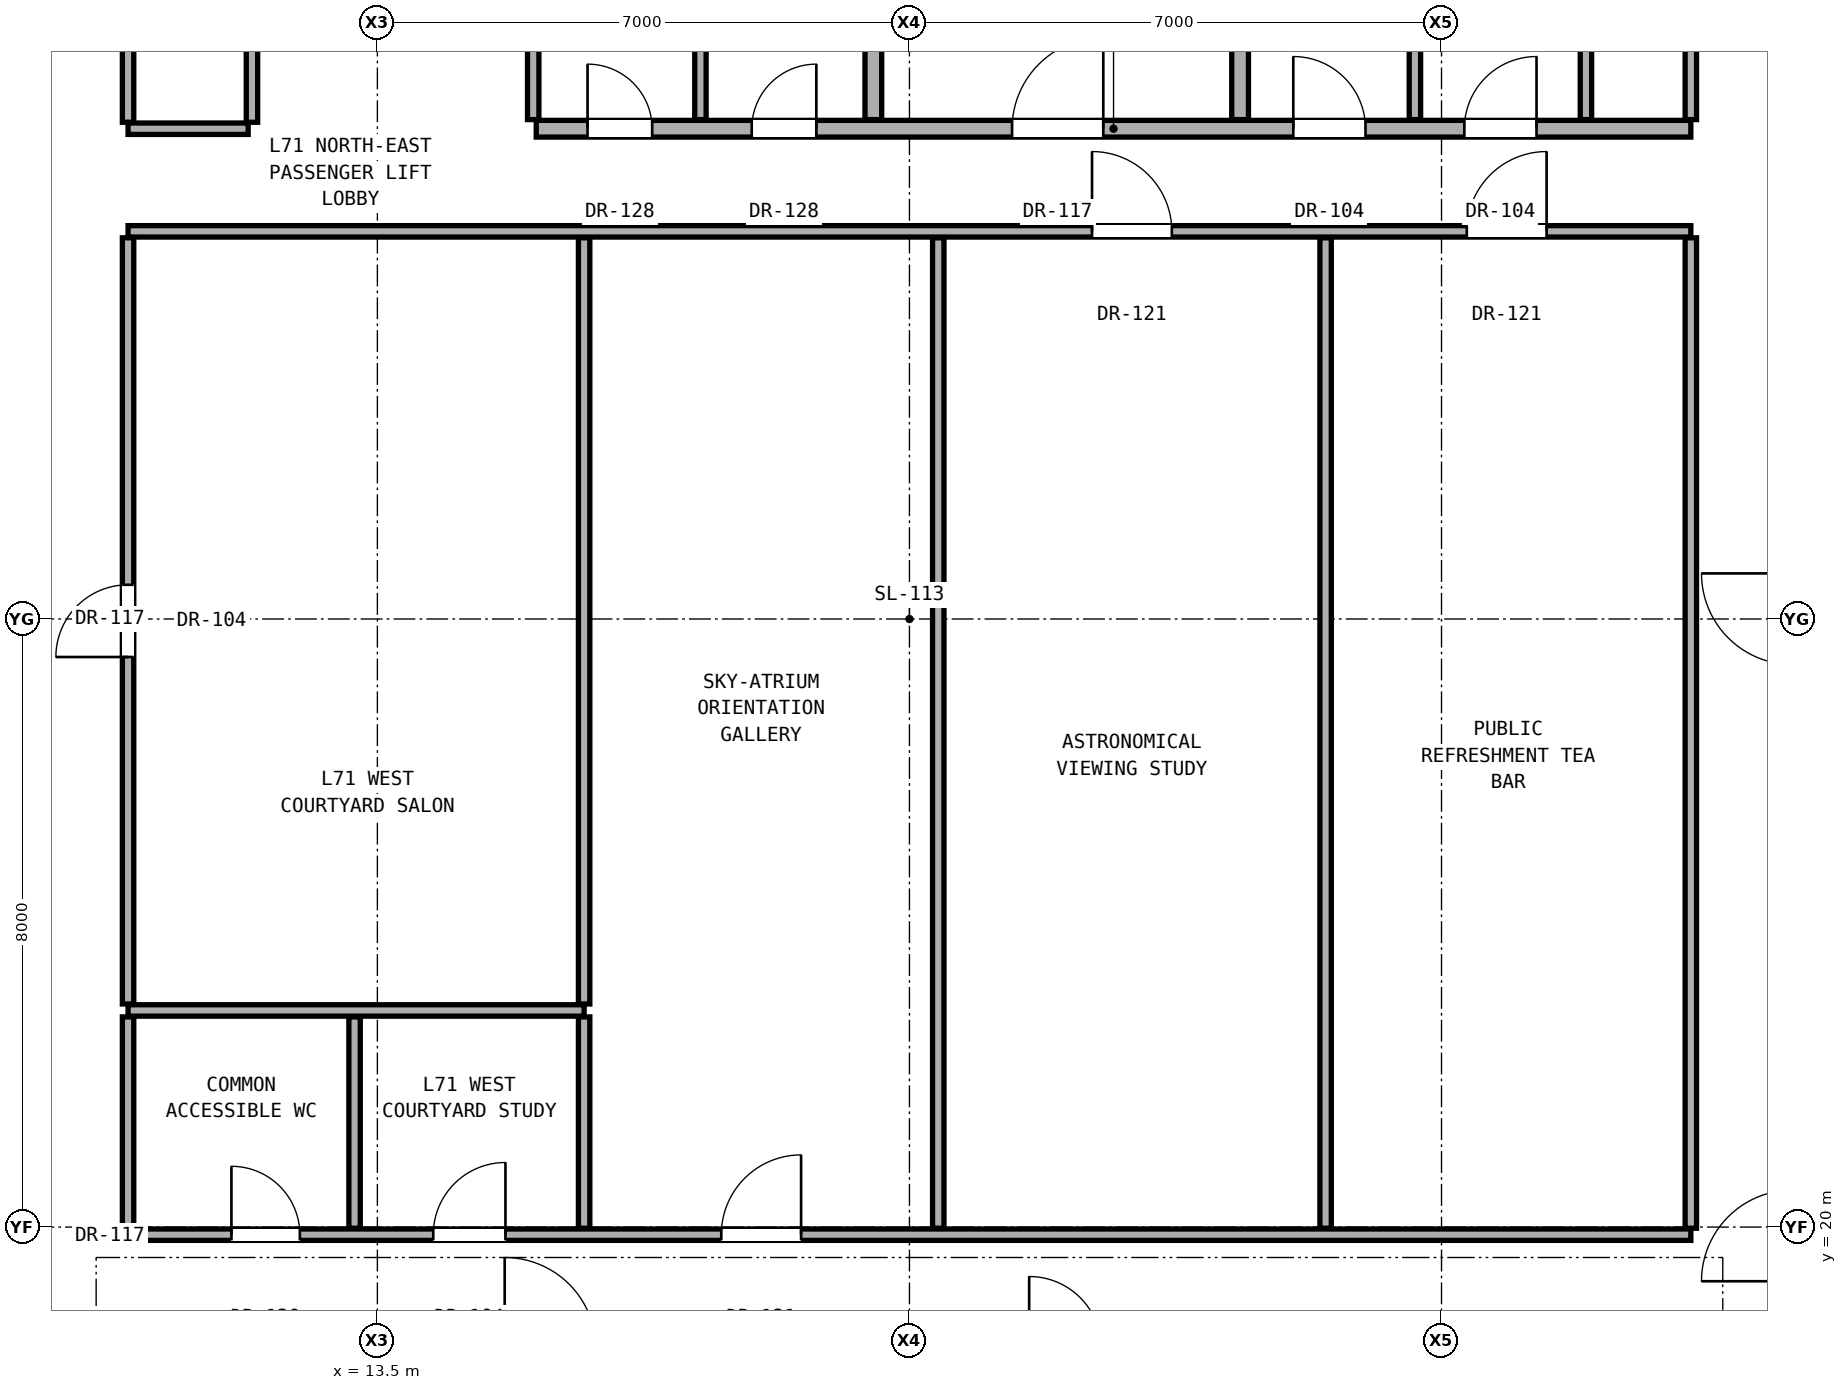
"""IFC4 building model, lengths in metres.
Left out: names, types, materials, properties, quantities, classifications, styles, units other than length and angle.
Written with IfcOpenShell. Run it as: python <this file> out.ifc"""

import sys

from ifc_helpers import new_model, si_unit, direction, frame, frame_2d, origin, place, context, subcontext, project, spatial, rectangle, extrude, element, fill, save


model = new_model("IFC4")
c1 = context("Model", 3, precision=1e-05, world=origin(), true_north=direction((0.0, 1.0)))
c2 = subcontext(c1, "Body", "Model", "MODEL_VIEW")
j1 = project(units=[si_unit("LENGTHUNIT", "METRE"), si_unit("PLANEANGLEUNIT", "RADIAN")], contexts=[c1])
p1 = place(None, origin())
s1 = spatial("IfcSite", under=j1, at=p1, CompositionType="ELEMENT")
p2 = place(p1, origin())
s2 = spatial("IfcBuilding", under=s1, at=p2, CompositionType="ELEMENT")
p3 = place(p2, frame((0.0, 0.0, 249.1)))
s3 = spatial("IfcBuildingStorey", under=s2, at=p3, CompositionType="ELEMENT", Elevation=249.1)
p4 = place(p3, frame((10.22, 19.9, 0.0), z_axis=(0.0, 0.0, 1.0), x_axis=(1.0, 0.0, 0.0)))
e1 = element("IfcWall", 1, at=p4, inside=s3, PredefinedType="PARTITIONING", context=c2, shape_type="SweptSolid", body=[
    extrude(rectangle(XDim=20.56, YDim=0.15, at=frame_2d((10.28, 0.0))), origin(), (0.0, 0.0, 1.0), 2.536),
])
p5 = place(p4, frame((1.36, 0.0, 0.0)))
e2 = element("IfcOpeningElement", 2, at=p5, cuts=e1, PredefinedType="OPENING", context=c2, shape_type="SweptSolid", body=[
    extrude(rectangle(XDim=0.9, YDim=2.1, at=frame_2d((0.45, 1.05))), frame((0.0, 0.085, 0.0), z_axis=(0.0, -1.0, 0.0), x_axis=(1.0, 0.0, 0.0)), (0.0, 0.0, 1.0), 0.17),
])
p6 = place(p4, frame((4.015, 0.0, 0.0)))
e3 = element("IfcOpeningElement", 3, at=p6, cuts=e1, PredefinedType="OPENING", context=c2, shape_type="SweptSolid", body=[
    extrude(rectangle(XDim=0.95, YDim=2.15, at=frame_2d((0.475, 1.075))), frame((0.0, 0.085, 0.0), z_axis=(0.0, -1.0, 0.0), x_axis=(1.0, 0.0, 0.0)), (0.0, 0.0, 1.0), 0.17),
])
p7 = place(p4, frame((7.804, 0.0, 0.0)))
e4 = element("IfcOpeningElement", 4, at=p7, cuts=e1, PredefinedType="OPENING", context=c2, shape_type="SweptSolid", body=[
    extrude(rectangle(XDim=1.05, YDim=2.2, at=frame_2d((0.525, 1.1))), frame((0.0, 0.085, 0.0), z_axis=(0.0, -1.0, 0.0), x_axis=(1.0, 0.0, 0.0)), (0.0, 0.0, 1.0), 0.17),
])
p8 = place(p3, frame((10.22, 22.85, 0.0), z_axis=(0.0, 0.0, 1.0), x_axis=(1.0, 0.0, 0.0)))
e5 = element("IfcWall", 5, at=p8, inside=s3, PredefinedType="PARTITIONING", context=c2, shape_type="SweptSolid", body=[
    extrude(rectangle(XDim=6.0, YDim=0.15, at=frame_2d((3.0, 0.0))), origin(), (0.0, 0.0, 1.0), 2.536),
])
p9 = place(p3, frame((10.22, 33.1, 0.0), z_axis=(0.0, 0.0, 1.0), x_axis=(1.0, 0.0, 0.0)))
e6 = element("IfcWall", 6, at=p9, inside=s3, PredefinedType="PARTITIONING", context=c2, shape_type="SweptSolid", body=[
    extrude(rectangle(XDim=20.56, YDim=0.15, at=frame_2d((10.28, 0.0))), origin(), (0.0, 0.0, 1.0), 2.536),
])
p10 = place(p9, frame((12.682, 0.0, 0.0)))
e7 = element("IfcOpeningElement", 7, at=p10, cuts=e6, PredefinedType="OPENING", context=c2, shape_type="SweptSolid", body=[
    extrude(rectangle(XDim=1.05, YDim=2.2, at=frame_2d((0.525, 1.1))), frame((0.0, 0.085, 0.0), z_axis=(0.0, -1.0, 0.0), x_axis=(1.0, 0.0, 0.0)), (0.0, 0.0, 1.0), 0.17),
])
p11 = place(p9, frame((17.613, 0.0, 0.0)))
e8 = element("IfcOpeningElement", 8, at=p11, cuts=e6, PredefinedType="OPENING", context=c2, shape_type="SweptSolid", body=[
    extrude(rectangle(XDim=1.05, YDim=2.2, at=frame_2d((0.525, 1.1))), frame((0.0, 0.085, 0.0), z_axis=(0.0, -1.0, 0.0), x_axis=(1.0, 0.0, 0.0)), (0.0, 0.0, 1.0), 0.17),
])
p12 = place(p3, frame((10.22, 34.45, 0.0), z_axis=(0.0, 0.0, 1.0), x_axis=(1.0, 0.0, 0.0)))
e9 = element("IfcWall", 9, at=p12, inside=s3, PredefinedType="PARTITIONING", context=c2, shape_type="SweptSolid", body=[
    extrude(rectangle(XDim=1.58, YDim=0.15, at=frame_2d((0.79, 0.0))), origin(), (0.0, 0.0, 1.0), 2.536),
])
p13 = place(p3, frame((15.59, 34.45, 0.0), z_axis=(0.0, 0.0, 1.0), x_axis=(1.0, 0.0, 0.0)))
e10 = element("IfcWall", 10, at=p13, inside=s3, PredefinedType="SOLIDWALL", context=c2, shape_type="SweptSolid", body=[
    extrude(rectangle(XDim=15.19, YDim=0.22, at=frame_2d((7.595, 0.0))), origin(), (0.0, 0.0, 1.0), 2.536),
])
p14 = place(p13, frame((6.26, 0.0, 0.0)))
e11 = element("IfcOpeningElement", 11, at=p14, cuts=e10, PredefinedType="OPENING", context=c2, shape_type="SweptSolid", body=[
    extrude(rectangle(XDim=1.2, YDim=2.25, at=frame_2d((0.6, 1.125))), frame((0.0, 0.12, 0.0), z_axis=(0.0, -1.0, 0.0), x_axis=(1.0, 0.0, 0.0)), (0.0, 0.0, 1.0), 0.24),
])
p15 = place(p13, frame((9.96, 0.0, 0.0)))
e12 = element("IfcOpeningElement", 12, at=p15, cuts=e10, PredefinedType="OPENING", context=c2, shape_type="SweptSolid", body=[
    extrude(rectangle(XDim=0.95, YDim=2.15, at=frame_2d((0.475, 1.075))), frame((0.0, 0.12, 0.0), z_axis=(0.0, -1.0, 0.0), x_axis=(1.0, 0.0, 0.0)), (0.0, 0.0, 1.0), 0.24),
])
p16 = place(p13, frame((12.21, 0.0, 0.0)))
e13 = element("IfcOpeningElement", 13, at=p16, cuts=e10, PredefinedType="OPENING", context=c2, shape_type="SweptSolid", body=[
    extrude(rectangle(XDim=0.95, YDim=2.15, at=frame_2d((0.475, 1.075))), frame((0.0, 0.12, 0.0), z_axis=(0.0, -1.0, 0.0), x_axis=(1.0, 0.0, 0.0)), (0.0, 0.0, 1.0), 0.24),
])
p17 = place(p13, frame((0.675, 0.0, 0.0)))
e14 = element("IfcOpeningElement", 14, at=p17, cuts=e10, PredefinedType="OPENING", context=c2, shape_type="SweptSolid", body=[
    extrude(rectangle(XDim=0.85, YDim=2.01, at=frame_2d((0.425, 1.005))), frame((0.0, 0.12, 0.0), z_axis=(0.0, -1.0, 0.0), x_axis=(1.0, 0.0, 0.0)), (0.0, 0.0, 1.0), 0.24),
])
p18 = place(p13, frame((2.835, 0.0, 0.0)))
e15 = element("IfcOpeningElement", 15, at=p18, cuts=e10, PredefinedType="OPENING", context=c2, shape_type="SweptSolid", body=[
    extrude(rectangle(XDim=0.85, YDim=2.01, at=frame_2d((0.425, 1.005))), frame((0.0, 0.12, 0.0), z_axis=(0.0, -1.0, 0.0), x_axis=(1.0, 0.0, 0.0)), (0.0, 0.0, 1.0), 0.24),
])
p19 = place(p3, frame((10.22, 19.985, 0.0), z_axis=(0.0, 0.0, 1.0), x_axis=(0.0, 1.0, 0.0)))
e16 = element("IfcWall", 16, at=p19, inside=s3, PredefinedType="PARTITIONING", context=c2, shape_type="SweptSolid", body=[
    extrude(rectangle(XDim=2.78, YDim=0.15, at=frame_2d((1.39, 0.0))), origin(), (0.0, 0.0, 1.0), 3.4),
])
p20 = place(p3, frame((10.22, 22.935, 0.0), z_axis=(0.0, 0.0, 1.0), x_axis=(0.0, 1.0, 0.0)))
e17 = element("IfcWall", 17, at=p20, inside=s3, PredefinedType="PARTITIONING", context=c2, shape_type="SweptSolid", body=[
    extrude(rectangle(XDim=10.08, YDim=0.15, at=frame_2d((5.04, 0.0))), origin(), (0.0, 0.0, 1.0), 2.696),
])
p21 = place(p20, frame((4.565, 0.0, 0.0)))
e18 = element("IfcOpeningElement", 18, at=p21, cuts=e17, PredefinedType="OPENING", context=c2, shape_type="SweptSolid", body=[
    extrude(rectangle(XDim=0.95, YDim=2.15, at=frame_2d((0.475, 1.075))), frame((0.0, 0.085, 0.0), z_axis=(0.0, -1.0, 0.0), x_axis=(1.0, 0.0, 0.0)), (0.0, 0.0, 1.0), 0.17),
])
p22 = place(p3, frame((10.22, 34.535, 0.0), z_axis=(0.0, 0.0, 1.0), x_axis=(0.0, 1.0, 0.0)))
e19 = element("IfcWall", 19, at=p22, inside=s3, PredefinedType="PARTITIONING", context=c2, shape_type="SweptSolid", body=[
    extrude(rectangle(XDim=9.13, YDim=0.15, at=frame_2d((4.565, 0.0))), origin(), (0.0, 0.0, 1.0), 2.792),
])
p23 = place(p3, frame((11.85, 34.535, 0.0), z_axis=(0.0, 0.0, 1.0), x_axis=(0.0, 1.0, 0.0)))
e20 = element("IfcWall", 20, at=p23, inside=s3, PredefinedType="PARTITIONING", context=c2, shape_type="SweptSolid", body=[
    extrude(rectangle(XDim=2.845, YDim=0.15, at=frame_2d((1.422, 0.0))), origin(), (0.0, 0.0, 1.0), 3.4),
])
p24 = place(p3, frame((13.2, 19.985, 0.0), z_axis=(0.0, 0.0, 1.0), x_axis=(0.0, 1.0, 0.0)))
e21 = element("IfcWall", 21, at=p24, inside=s3, PredefinedType="PARTITIONING", context=c2, shape_type="SweptSolid", body=[
    extrude(rectangle(XDim=2.78, YDim=0.15, at=frame_2d((1.39, 0.0))), origin(), (0.0, 0.0, 1.0), 3.4),
])
p25 = place(p3, frame((15.55, 34.57, 0.0), z_axis=(0.0, 0.0, 1.0), x_axis=(0.0, 1.0, 0.0)))
e22 = element("IfcWall", 22, at=p25, inside=s3, PredefinedType="PARTITIONING", context=c2, shape_type="SweptSolid", body=[
    extrude(rectangle(XDim=2.81, YDim=0.15, at=frame_2d((1.405, 0.0))), origin(), (0.0, 0.0, 1.0), 3.4),
])
p26 = place(p3, frame((16.22, 19.985, 0.0), z_axis=(0.0, 0.0, 1.0), x_axis=(0.0, 1.0, 0.0)))
e23 = element("IfcWall", 23, at=p26, inside=s3, PredefinedType="PARTITIONING", context=c2, shape_type="SweptSolid", body=[
    extrude(rectangle(XDim=2.78, YDim=0.15, at=frame_2d((1.39, 0.0))), origin(), (0.0, 0.0, 1.0), 3.4),
])
p27 = place(p3, frame((16.22, 22.935, 0.0), z_axis=(0.0, 0.0, 1.0), x_axis=(0.0, 1.0, 0.0)))
e24 = element("IfcWall", 24, at=p27, inside=s3, PredefinedType="PARTITIONING", context=c2, shape_type="SweptSolid", body=[
    extrude(rectangle(XDim=10.08, YDim=0.15, at=frame_2d((5.04, 0.0))), origin(), (0.0, 0.0, 1.0), 2.536),
])
p28 = place(p3, frame((17.75, 34.57, 0.0), z_axis=(0.0, 0.0, 1.0), x_axis=(0.0, 1.0, 0.0)))
e25 = element("IfcWall", 25, at=p28, inside=s3, PredefinedType="PARTITIONING", context=c2, shape_type="SweptSolid", body=[
    extrude(rectangle(XDim=2.81, YDim=0.15, at=frame_2d((1.405, 0.0))), origin(), (0.0, 0.0, 1.0), 3.4),
])
p29 = place(p3, frame((20.025, 34.57, 0.0), z_axis=(0.0, 0.0, 1.0), x_axis=(0.0, 1.0, 0.0)))
e26 = element("IfcWall", 26, at=p29, inside=s3, PredefinedType="SOLIDWALL", context=c2, shape_type="SweptSolid", body=[
    extrude(rectangle(XDim=2.81, YDim=0.22, at=frame_2d((1.405, 0.0))), origin(), (0.0, 0.0, 1.0), 3.4),
])
p30 = place(p3, frame((20.879, 19.985, 0.0), z_axis=(0.0, 0.0, 1.0), x_axis=(0.0, 1.0, 0.0)))
e27 = element("IfcWall", 27, at=p30, inside=s3, PredefinedType="PARTITIONING", context=c2, shape_type="SweptSolid", body=[
    extrude(rectangle(XDim=13.03, YDim=0.15, at=frame_2d((6.515, 0.0))), origin(), (0.0, 0.0, 1.0), 2.536),
])
p31 = place(p3, frame((24.85, 34.57, 0.0), z_axis=(0.0, 0.0, 1.0), x_axis=(0.0, 1.0, 0.0)))
e28 = element("IfcWall", 28, at=p31, inside=s3, PredefinedType="SOLIDWALL", context=c2, shape_type="SweptSolid", body=[
    extrude(rectangle(XDim=2.81, YDim=0.22, at=frame_2d((1.405, 0.0))), origin(), (0.0, 0.0, 1.0), 3.4),
])
p32 = place(p3, frame((25.975, 19.985, 0.0), z_axis=(0.0, 0.0, 1.0), x_axis=(0.0, 1.0, 0.0)))
e29 = element("IfcWall", 29, at=p32, inside=s3, PredefinedType="PARTITIONING", context=c2, shape_type="SweptSolid", body=[
    extrude(rectangle(XDim=13.03, YDim=0.15, at=frame_2d((6.515, 0.0))), origin(), (0.0, 0.0, 1.0), 2.536),
])
for number, where, z_axis, x_axis in (
    (30, (27.15, 34.57, 0.0), (0.0, 0.0, 1.0), (0.0, 1.0, 0.0)),
    (31, (29.4, 34.57, 0.0), (0.0, 0.0, 1.0), (0.0, 1.0, 0.0)),
):
    element("IfcWall", number, at=place(p3, frame(where, z_axis=z_axis, x_axis=x_axis)), inside=s3, PredefinedType="PARTITIONING", context=c2, shape_type="SweptSolid", body=[
        extrude(rectangle(XDim=2.81, YDim=0.15, at=frame_2d((1.405, 0.0))), origin(), (0.0, 0.0, 1.0), 3.4),
    ])
p33 = place(p3, frame((30.78, 19.985, 0.0), z_axis=(0.0, 0.0, 1.0), x_axis=(0.0, 1.0, 0.0)))
e32 = element("IfcWall", 32, at=p33, inside=s3, PredefinedType="PARTITIONING", context=c2, shape_type="SweptSolid", body=[
    extrude(rectangle(XDim=13.03, YDim=0.15, at=frame_2d((6.515, 0.0))), origin(), (0.0, 0.0, 1.0), 2.696),
])
p34 = place(p3, frame((30.78, 34.57, 0.0), z_axis=(0.0, 0.0, 1.0), x_axis=(0.0, 1.0, 0.0)))
e33 = element("IfcWall", 33, at=p34, inside=s3, PredefinedType="PARTITIONING", context=c2, shape_type="SweptSolid", body=[
    extrude(rectangle(XDim=9.095, YDim=0.15, at=frame_2d((4.547, 0.0))), origin(), (0.0, 0.0, 1.0), 2.792),
])
p35 = place(p14, origin())
e34 = element("IfcDoor", 34, at=p35, inside=s3, OperationType="SINGLE_SWING_RIGHT", PredefinedType="DOOR", context=c2, shape_type="SweptSolid", body=[
    extrude(rectangle(XDim=1.2, YDim=2.25, at=frame_2d((0.6, 1.125))), frame((0.0, 0.025, 0.0), z_axis=(0.0, -1.0, 0.0), x_axis=(1.0, 0.0, 0.0)), (0.0, 0.0, 1.0), 0.05),
])
fill(e11, e34)
p36 = place(p15, origin())
e35 = element("IfcDoor", 35, at=p36, inside=s3, OperationType="SINGLE_SWING_LEFT", PredefinedType="DOOR", context=c2, shape_type="SweptSolid", body=[
    extrude(rectangle(XDim=0.95, YDim=2.15, at=frame_2d((0.475, 1.075))), frame((0.0, 0.025, 0.0), z_axis=(0.0, -1.0, 0.0), x_axis=(1.0, 0.0, 0.0)), (0.0, 0.0, 1.0), 0.05),
])
fill(e12, e35)
p37 = place(p16, origin())
e36 = element("IfcDoor", 36, at=p37, inside=s3, OperationType="SINGLE_SWING_RIGHT", PredefinedType="DOOR", context=c2, shape_type="SweptSolid", body=[
    extrude(rectangle(XDim=0.95, YDim=2.15, at=frame_2d((0.475, 1.075))), frame((0.0, 0.025, 0.0), z_axis=(0.0, -1.0, 0.0), x_axis=(1.0, 0.0, 0.0)), (0.0, 0.0, 1.0), 0.05),
])
fill(e13, e36)
p38 = place(p17, origin())
e37 = element("IfcDoor", 37, at=p38, inside=s3, OperationType="SINGLE_SWING_LEFT", PredefinedType="DOOR", context=c2, shape_type="SweptSolid", body=[
    extrude(rectangle(XDim=0.85, YDim=2.01, at=frame_2d((0.425, 1.005))), frame((0.0, 0.025, 0.0), z_axis=(0.0, -1.0, 0.0), x_axis=(1.0, 0.0, 0.0)), (0.0, 0.0, 1.0), 0.05),
])
fill(e14, e37)
p39 = place(p18, origin())
e38 = element("IfcDoor", 38, at=p39, inside=s3, OperationType="SINGLE_SWING_RIGHT", PredefinedType="DOOR", context=c2, shape_type="SweptSolid", body=[
    extrude(rectangle(XDim=0.85, YDim=2.01, at=frame_2d((0.425, 1.005))), frame((0.0, 0.025, 0.0), z_axis=(0.0, -1.0, 0.0), x_axis=(1.0, 0.0, 0.0)), (0.0, 0.0, 1.0), 0.05),
])
fill(e15, e38)
p40 = place(p5, origin())
e39 = element("IfcDoor", 39, at=p40, inside=s3, OperationType="SINGLE_SWING_LEFT", PredefinedType="DOOR", context=c2, shape_type="SweptSolid", body=[
    extrude(rectangle(XDim=0.9, YDim=2.1, at=frame_2d((0.45, 1.05))), frame((0.0, 0.025, 0.0), z_axis=(0.0, -1.0, 0.0), x_axis=(1.0, 0.0, 0.0)), (0.0, 0.0, 1.0), 0.05),
])
fill(e2, e39)
p41 = place(p6, origin())
e40 = element("IfcDoor", 40, at=p41, inside=s3, OperationType="SINGLE_SWING_RIGHT", PredefinedType="DOOR", context=c2, shape_type="SweptSolid", body=[
    extrude(rectangle(XDim=0.95, YDim=2.15, at=frame_2d((0.475, 1.075))), frame((0.0, 0.025, 0.0), z_axis=(0.0, -1.0, 0.0), x_axis=(1.0, 0.0, 0.0)), (0.0, 0.0, 1.0), 0.05),
])
fill(e3, e40)
p42 = place(p21, origin())
e41 = element("IfcDoor", 41, at=p42, inside=s3, OperationType="SINGLE_SWING_LEFT", PredefinedType="DOOR", context=c2, shape_type="SweptSolid", body=[
    extrude(rectangle(XDim=0.95, YDim=2.15, at=frame_2d((0.475, 1.075))), frame((0.0, 0.025, 0.0), z_axis=(0.0, -1.0, 0.0), x_axis=(1.0, 0.0, 0.0)), (0.0, 0.0, 1.0), 0.05),
])
fill(e18, e41)
p43 = place(p7, origin())
e42 = element("IfcDoor", 42, at=p43, inside=s3, OperationType="SINGLE_SWING_RIGHT", PredefinedType="DOOR", context=c2, shape_type="SweptSolid", body=[
    extrude(rectangle(XDim=1.05, YDim=2.2, at=frame_2d((0.525, 1.1))), frame((0.0, 0.025, 0.0), z_axis=(0.0, -1.0, 0.0), x_axis=(1.0, 0.0, 0.0)), (0.0, 0.0, 1.0), 0.05),
])
fill(e4, e42)
p44 = place(p10, origin())
e43 = element("IfcDoor", 43, at=p44, inside=s3, OperationType="SINGLE_SWING_LEFT", PredefinedType="DOOR", context=c2, shape_type="SweptSolid", body=[
    extrude(rectangle(XDim=1.05, YDim=2.2, at=frame_2d((0.525, 1.1))), frame((0.0, 0.025, 0.0), z_axis=(0.0, -1.0, 0.0), x_axis=(1.0, 0.0, 0.0)), (0.0, 0.0, 1.0), 0.05),
])
fill(e7, e43)
p45 = place(p11, origin())
e44 = element("IfcDoor", 44, at=p45, inside=s3, OperationType="SINGLE_SWING_RIGHT", PredefinedType="DOOR", context=c2, shape_type="SweptSolid", body=[
    extrude(rectangle(XDim=1.05, YDim=2.2, at=frame_2d((0.525, 1.1))), frame((0.0, 0.025, 0.0), z_axis=(0.0, -1.0, 0.0), x_axis=(1.0, 0.0, 0.0)), (0.0, 0.0, 1.0), 0.05),
])
fill(e8, e44)
save(model, sys.argv[1])
